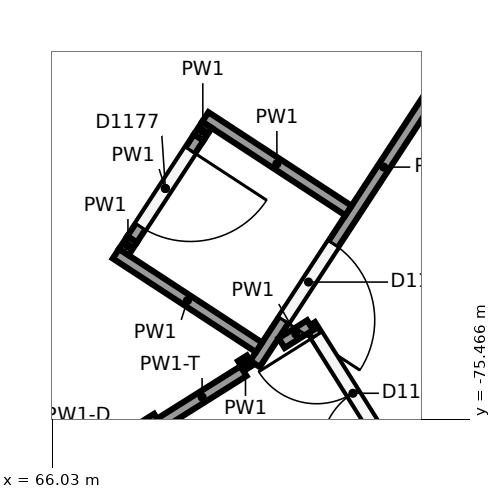
"""IFC4 building model, lengths in metres.
Left out: names, types, materials, properties, quantities, classifications, styles, units other than length and angle.
Written with IfcOpenShell. Run it as: python <this file> out.ifc"""

import sys

from ifc_helpers import new_model, si_unit, direction, frame, frame_2d, origin, place, context, subcontext, project, spatial, rectangle, extrude, element, fill, save


model = new_model("IFC4")
c1 = context("Model", 3, precision=1e-05, world=origin(), true_north=direction((0.0, 1.0)))
c2 = subcontext(c1, "Body", "Model", "MODEL_VIEW")
j1 = project(units=[si_unit("LENGTHUNIT", "METRE"), si_unit("PLANEANGLEUNIT", "RADIAN")], contexts=[c1])
p1 = place(None, origin())
s1 = spatial("IfcSite", under=j1, at=p1, CompositionType="ELEMENT")
p2 = place(p1, origin())
s2 = spatial("IfcBuilding", under=s1, at=p2, CompositionType="ELEMENT")
p3 = place(p2, frame((0.0, 0.0, 12.0)))
s3 = spatial("IfcBuildingStorey", under=s2, at=p3, CompositionType="ELEMENT", Elevation=12.0)
p4 = place(p3, frame((72.085, -69.559, 0.0), z_axis=(0.0, 0.0, 1.0), x_axis=(-0.547328054804, -0.836918156348, 0.0)))
e1 = element("IfcWall", 1, at=p4, inside=s3, PredefinedType="PARTITIONING", context=c2, shape_type="SweptSolid", body=[
    extrude(rectangle(XDim=6.186, YDim=0.15, at=frame_2d((3.093, 0.0))), origin(), (0.0, 0.0, 1.0), 4.026),
])
p5 = place(p4, frame((4.3, 0.0, 0.0)))
e2 = element("IfcOpeningElement", 2, at=p5, cuts=e1, PredefinedType="OPENING", context=c2, shape_type="SweptSolid", body=[
    extrude(rectangle(XDim=1.2, YDim=2.1, at=frame_2d((0.6, 1.05))), frame((0.0, 0.085, 0.0), z_axis=(0.0, -1.0, 0.0), x_axis=(1.0, 0.0, 0.0)), (0.0, 0.0, 1.0), 0.17),
])
p6 = place(p3, frame((68.548, -74.832, 0.0), z_axis=(0.0, 0.0, 1.0), x_axis=(-0.846736781525, -0.53201205138, 0.0)))
e3 = element("IfcWall", 3, at=p6, inside=s3, PredefinedType="PARTITIONING", context=c2, shape_type="SweptSolid", body=[
    extrude(rectangle(XDim=1.285, YDim=0.15, at=frame_2d((0.643, 0.0))), origin(), (0.0, 0.0, 1.0), 4.026),
])
p7 = place(p3, frame((68.633, -74.69, 0.0), z_axis=(0.0, 0.0, 1.0), x_axis=(-0.846796817222, -0.531916488129, 0.0)))
e4 = element("IfcWall", 4, at=p7, inside=s3, PredefinedType="PARTITIONING", context=c2, shape_type="SweptSolid", body=[
    extrude(rectangle(XDim=0.137, YDim=0.15, at=frame_2d((0.069, 0.0))), origin(), (0.0, 0.0, 1.0), 5.65),
])
p8 = place(p3, frame((67.411, -75.457, 0.0), z_axis=(0.0, 0.0, 1.0), x_axis=(-0.846666992422, -0.532123109762, 0.0)))
e5 = element("IfcWall", 5, at=p8, inside=s3, PredefinedType="PARTITIONING", context=c2, shape_type="SweptSolid", body=[
    extrude(rectangle(XDim=1.445, YDim=0.15, at=frame_2d((0.723, 0.0))), origin(), (0.0, 0.0, 1.0), 4.55),
])
p9 = place(p3, frame((72.143, -78.552, 0.0), z_axis=(0.0, 0.0, 1.0), x_axis=(-0.532063867314, 0.846704222913, 0.0)))
e6 = element("IfcWall", 6, at=p9, inside=s3, PredefinedType="PARTITIONING", context=c2, shape_type="SweptSolid", body=[
    extrude(rectangle(XDim=5.108, YDim=0.15, at=frame_2d((2.554, 0.0))), origin(), (0.0, 0.0, 1.0), 4.55),
])
p10 = place(p9, frame((3.15, 0.0, 0.0)))
e7 = element("IfcOpeningElement", 7, at=p10, cuts=e6, PredefinedType="OPENING", context=c2, shape_type="SweptSolid", body=[
    extrude(rectangle(XDim=1.8, YDim=2.1, at=frame_2d((0.9, 1.05))), frame((0.0, 0.085, 0.0), z_axis=(0.0, -1.0, 0.0), x_axis=(1.0, 0.0, 0.0)), (0.0, 0.0, 1.0), 0.17),
])
p11 = place(p9, frame((0.05, 0.0, 0.0)))
e8 = element("IfcOpeningElement", 8, at=p11, cuts=e6, PredefinedType="OPENING", context=c2, shape_type="SweptSolid", body=[
    extrude(rectangle(XDim=1.8, YDim=2.1, at=frame_2d((0.9, 1.05))), frame((0.0, 0.085, 0.0), z_axis=(0.0, -1.0, 0.0), x_axis=(1.0, 0.0, 0.0)), (0.0, 0.0, 1.0), 0.17),
])
p12 = place(p3, frame((69.425, -74.227, 0.0), z_axis=(0.0, 0.0, 1.0), x_axis=(-0.846757169089, -0.531979601674, 0.0)))
e9 = element("IfcWall", 9, at=p12, inside=s3, PredefinedType="PARTITIONING", context=c2, shape_type="SweptSolid", body=[
    extrude(rectangle(XDim=0.443, YDim=0.15, at=frame_2d((0.221, 0.0))), origin(), (0.0, 0.0, 1.0), 5.65),
])
for number, where, z_axis, x_axis in (
    (10, (69.929, -72.719, 0.0), (0.0, 0.0, 1.0), (-0.837, 0.547, 0.0)),
    (11, (68.752, -74.519, 0.0), (0.0, 0.0, 1.0), (-0.837, 0.547, 0.0)),
):
    element("IfcWall", number, at=place(p3, frame(where, z_axis=z_axis, x_axis=x_axis)), inside=s3, PredefinedType="PARTITIONING", context=c2, shape_type="SweptSolid", body=[
        extrude(rectangle(XDim=2.25, YDim=0.15, at=frame_2d((1.125, 0.0))), origin(), (0.0, 0.0, 1.0), 5.65),
    ])
p13 = place(p3, frame((68.068, -71.592, 0.0), z_axis=(0.0, 0.0, 1.0), x_axis=(-0.546788900939, -0.837270504562, 0.0)))
e12 = element("IfcWall", 12, at=p13, inside=s3, PredefinedType="PARTITIONING", context=c2, shape_type="SweptSolid", body=[
    extrude(rectangle(XDim=0.2, YDim=0.15, at=frame_2d((0.1, 0.0))), origin(), (0.0, 0.0, 1.0), 5.65),
])
p14 = place(p3, frame((67.958, -71.759, 0.0), z_axis=(0.0, 0.0, 1.0), x_axis=(-0.547319249347, -0.836923914878, 0.0)))
e13 = element("IfcWall", 13, at=p14, inside=s3, PredefinedType="PARTITIONING", context=c2, shape_type="SweptSolid", body=[
    extrude(rectangle(XDim=1.6, YDim=0.15, at=frame_2d((0.8, 0.0))), origin(), (0.0, 0.0, 1.0), 5.65),
])
p15 = place(p14, frame((0.2, 0.0, 0.0)))
e14 = element("IfcOpeningElement", 14, at=p15, cuts=e13, PredefinedType="OPENING", context=c2, shape_type="SweptSolid", body=[
    extrude(rectangle(XDim=1.2, YDim=2.1, at=frame_2d((0.6, 1.05))), frame((0.0, 0.085, 0.0), z_axis=(0.0, -1.0, 0.0), x_axis=(1.0, 0.0, 0.0)), (0.0, 0.0, 1.0), 0.17),
])
p16 = place(p3, frame((67.083, -73.098, 0.0), z_axis=(0.0, 0.0, 1.0), x_axis=(-0.548202987106, -0.836345314405, 0.0)))
e15 = element("IfcWall", 15, at=p16, inside=s3, PredefinedType="PARTITIONING", context=c2, shape_type="SweptSolid", body=[
    extrude(rectangle(XDim=0.2, YDim=0.15, at=frame_2d((0.1, 0.0))), origin(), (0.0, 0.0, 1.0), 5.65),
])
p17 = place(p5, origin())
e16 = element("IfcDoor", 16, at=p17, inside=s3, OperationType="SINGLE_SWING_RIGHT", PredefinedType="DOOR", context=c2, shape_type="SweptSolid", body=[
    extrude(rectangle(XDim=1.2, YDim=2.1, at=frame_2d((0.6, 1.05))), frame((0.0, 0.025, 0.0), z_axis=(0.0, -1.0, 0.0), x_axis=(1.0, 0.0, 0.0)), (0.0, 0.0, 1.0), 0.05),
])
fill(e2, e16)
p18 = place(p10, origin())
e17 = element("IfcDoor", 17, at=p18, inside=s3, OperationType="DOUBLE_DOOR_SINGLE_SWING", PredefinedType="DOOR", context=c2, shape_type="SweptSolid", body=[
    extrude(rectangle(XDim=1.8, YDim=2.1, at=frame_2d((0.9, 1.05))), frame((0.0, 0.025, 0.0), z_axis=(0.0, -1.0, 0.0), x_axis=(1.0, 0.0, 0.0)), (0.0, 0.0, 1.0), 0.05),
])
fill(e7, e17)
p19 = place(p15, origin())
e18 = element("IfcDoor", 18, at=p19, inside=s3, OperationType="SINGLE_SWING_LEFT", PredefinedType="DOOR", context=c2, shape_type="SweptSolid", body=[
    extrude(rectangle(XDim=1.2, YDim=2.1, at=frame_2d((0.6, 1.05))), frame((0.0, 0.025, 0.0), z_axis=(0.0, -1.0, 0.0), x_axis=(1.0, 0.0, 0.0)), (0.0, 0.0, 1.0), 0.05),
])
fill(e14, e18)
save(model, sys.argv[1])
